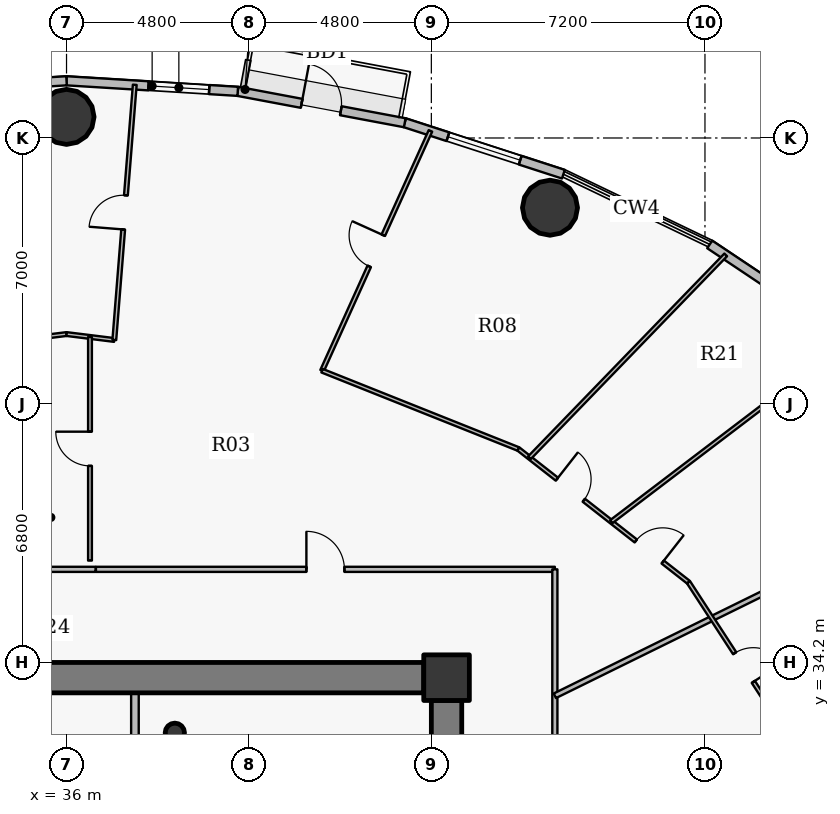
"""IFC4 building model, lengths in metres.
Left out: names, types, materials, properties, quantities, classifications, styles, units other than length and angle.
Written with IfcOpenShell. Run it as: python <this file> out.ifc"""

import sys

from ifc_helpers import new_model, si_unit, direction, frame, frame_2d, origin, origin_2d, place, context, subcontext, project, spatial, rectangle, hollow_circle, extrude, source, transform, mapped, element, fill, save


model = new_model("IFC4")
c1 = context("Model", 3, precision=1e-05, world=origin(), true_north=direction((0.0, 1.0)))
c2 = subcontext(c1, "Body", "Model", "MODEL_VIEW")
j1 = project(units=[si_unit("LENGTHUNIT", "METRE"), si_unit("PLANEANGLEUNIT", "RADIAN")], contexts=[c1])
p1 = place(None, origin())
s1 = spatial("IfcSite", under=j1, at=p1, CompositionType="ELEMENT")
p2 = place(p1, origin())
s2 = spatial("IfcBuilding", under=s1, at=p2, CompositionType="ELEMENT")
p3 = place(p2, frame((0.0, 0.0, 142.2)))
s3 = spatial("IfcBuildingStorey", under=s2, at=p3, CompositionType="ELEMENT", Elevation=142.2)
p4 = place(p3, frame((46.0, 33.8, 0.0), z_axis=(0.0, 0.0, 1.0), x_axis=(1.0, 0.0, 0.0)))
e1 = element("IfcColumn", 1, at=p4, inside=s3, PredefinedType="COLUMN", context=c2, shape_type="SweptSolid", body=[
    extrude(rectangle(XDim=1.2, YDim=1.2, at=origin_2d()), origin(), (0.0, 0.0, 1.0), 3.75),
])
p5 = place(p3, frame((38.85, 32.35, 0.0), z_axis=(0.0, 0.0, 1.0), x_axis=(1.0, 0.0, 0.0)))
e2 = element("IfcColumn", 2, at=p5, inside=s3, PredefinedType="COLUMN", context=c2, shape_type="SweptSolid", body=[
    extrude(hollow_circle(Radius=0.254, WallThickness=0.02, at=origin_2d()), origin(), (0.0, 0.0, 1.0), 3.75),
])
p6 = place(p3, frame((26.6, 33.8, 0.0), z_axis=(0.0, 0.0, 1.0), x_axis=(1.0, 0.0, 0.0)))
e3 = element("IfcWall", 3, at=p6, inside=s3, PredefinedType="SHEAR", context=c2, shape_type="SweptSolid", body=[
    extrude(rectangle(XDim=18.8, YDim=0.8, at=frame_2d((9.4, 0.0))), origin(), (0.0, 0.0, 1.0), 2.9),
])
p7 = place(p3, frame((46.0, 33.2, 0.0), z_axis=(0.0, 0.0, 1.0), x_axis=(0.0, -1.0, 0.0)))
e4 = element("IfcWall", 4, at=p7, inside=s3, PredefinedType="SHEAR", context=c2, shape_type="SweptSolid", body=[
    extrude(rectangle(XDim=12.4, YDim=0.8, at=frame_2d((6.2, 0.0))), origin(), (0.0, 0.0, 1.0), 2.9),
])
p8 = place(p7, frame((5.79, 0.0, 0.0)))
e5 = element("IfcOpeningElement", 5, at=p8, cuts=e4, PredefinedType="OPENING", context=c2, shape_type="SweptSolid", body=[
    extrude(rectangle(XDim=0.82, YDim=2.1, at=origin_2d()), frame((0.41, 0.41, 1.05), z_axis=(0.0, -1.0, 0.0), x_axis=(1.0, 0.0, 0.0)), (0.0, 0.0, 1.0), 0.82),
])
for number, where, z_axis, x_axis in (
    (6, (48.722, 46.165, 0.0), (0.0, 0.0, 1.0), (1.0, 0.0, 0.0)),
    (7, (36.0, 48.555, 0.0), (0.0, 0.0, 1.0), (1.0, 0.0, 0.0)),
):
    element("IfcColumn", number, at=place(p3, frame(where, z_axis=z_axis, x_axis=x_axis)), inside=s3, PredefinedType="COLUMN", context=c2, shape_type="SweptSolid", body=[
        extrude(hollow_circle(Radius=0.725, WallThickness=0.042, at=origin_2d()), origin(), (0.0, 0.0, 1.0), 3.75),
    ])
p9 = place(p3, frame((52.925, 45.199, 0.0), z_axis=(0.0, 0.0, 1.0), x_axis=(0.831221811447, -0.555940914284, 0.0)))
e8 = element("IfcWall", 8, at=p9, inside=s3, PredefinedType="SOLIDWALL", context=c2, shape_type="SweptSolid", body=[
    extrude(rectangle(XDim=4.13, YDim=0.24, at=frame_2d((2.065, 0.0))), origin(), (0.0, 0.0, 1.0), 3.45),
])
p10 = place(p3, frame((44.9, 48.401, 0.0), z_axis=(0.0, 0.0, 1.0), x_axis=(0.951211346073, -0.308540070495, 0.0)))
e9 = element("IfcWall", 9, at=p10, inside=s3, PredefinedType="SOLIDWALL", context=c2, shape_type="SweptSolid", body=[
    extrude(rectangle(XDim=4.388, YDim=0.24, at=frame_2d((2.194, 0.0))), origin(), (0.0, 0.0, 1.0), 3.45),
])
p11 = place(p10, frame((1.194, 0.0, 0.9)))
e10 = element("IfcOpeningElement", 10, at=p11, cuts=e9, PredefinedType="OPENING", context=c2, shape_type="SweptSolid", body=[
    extrude(rectangle(XDim=2.0, YDim=1.75, at=origin_2d()), frame((1.0, 0.13, 0.875), z_axis=(0.0, -1.0, 0.0), x_axis=(1.0, 0.0, 0.0)), (0.0, 0.0, 1.0), 0.26),
])
p12 = place(p3, frame((40.506, 49.227, 0.0), z_axis=(0.0, 0.0, 1.0), x_axis=(0.982789252177, -0.184730305596, 0.0)))
e11 = element("IfcWall", 11, at=p12, inside=s3, PredefinedType="SOLIDWALL", context=c2, shape_type="SweptSolid", body=[
    extrude(rectangle(XDim=4.471, YDim=0.24, at=frame_2d((2.235, 0.0))), origin(), (0.0, 0.0, 1.0), 3.45),
])
p13 = place(p12, frame((1.711, 0.0, 0.0)))
e12 = element("IfcOpeningElement", 12, at=p13, cuts=e11, PredefinedType="OPENING", context=c2, shape_type="SweptSolid", body=[
    extrude(rectangle(XDim=1.05, YDim=2.15, at=origin_2d()), frame((0.525, 0.13, 1.075), z_axis=(0.0, -1.0, 0.0), x_axis=(1.0, 0.0, 0.0)), (0.0, 0.0, 1.0), 0.26),
])
p14 = place(p3, frame((36.0, 49.505, 0.0), z_axis=(0.0, 0.0, 1.0), x_axis=(0.998107531589, -0.061492726276, 0.0)))
e13 = element("IfcWall", 13, at=p14, inside=s3, PredefinedType="SOLIDWALL", context=c2, shape_type="SweptSolid", body=[
    extrude(rectangle(XDim=4.514, YDim=0.24, at=frame_2d((2.257, 0.0))), origin(), (0.0, 0.0, 1.0), 3.45),
])
p15 = place(p14, frame((2.161, 0.0, 0.9)))
e14 = element("IfcOpeningElement", 14, at=p15, cuts=e13, PredefinedType="OPENING", context=c2, shape_type="SweptSolid", body=[
    extrude(rectangle(XDim=1.6, YDim=1.75, at=origin_2d()), frame((0.8, 0.13, 0.875), z_axis=(0.0, -1.0, 0.0), x_axis=(1.0, 0.0, 0.0)), (0.0, 0.0, 1.0), 0.26),
])
p16 = place(p3, frame((31.494, 49.227, 0.0), z_axis=(0.0, 0.0, 1.0), x_axis=(0.998107531589, 0.061492726276, 0.0)))
e15 = element("IfcWall", 15, at=p16, inside=s3, PredefinedType="SOLIDWALL", context=c2, shape_type="SweptSolid", body=[
    extrude(rectangle(XDim=4.514, YDim=0.24, at=frame_2d((2.257, 0.0))), origin(), (0.0, 0.0, 1.0), 3.45),
])
p17 = place(p16, frame((1.257, 0.0, 0.9)))
e16 = element("IfcOpeningElement", 16, at=p17, cuts=e15, PredefinedType="OPENING", context=c2, shape_type="SweptSolid", body=[
    extrude(rectangle(XDim=2.0, YDim=1.75, at=origin_2d()), frame((1.0, 0.13, 0.875), z_axis=(0.0, -1.0, 0.0), x_axis=(1.0, 0.0, 0.0)), (0.0, 0.0, 1.0), 0.26),
])
p18 = place(p3, frame((29.749, 42.066, 0.0), z_axis=(0.0, 0.0, 1.0), x_axis=(0.992395485088, 0.123090215599, 0.0)))
e17 = element("IfcWall", 17, at=p18, inside=s3, PredefinedType="PARTITIONING", context=c2, shape_type="SweptSolid", body=[
    extrude(rectangle(XDim=6.299, YDim=0.1, at=frame_2d((3.15, 0.0))), origin(), (0.0, 0.0, 1.0), 2.885),
])
p19 = place(p3, frame((36.0, 42.841, 0.0), z_axis=(0.0, 0.0, 1.0), x_axis=(0.992384274499, -0.123180565541, 0.0)))
e18 = element("IfcWall", 18, at=p19, inside=s3, PredefinedType="PARTITIONING", context=c2, shape_type="SweptSolid", body=[
    extrude(rectangle(XDim=1.267, YDim=0.1, at=frame_2d((0.633, 0.0))), origin(), (0.0, 0.0, 1.0), 2.885),
])
p20 = place(p3, frame((36.617, 36.881, 0.0), z_axis=(0.0, 0.0, 1.0), x_axis=(0.0, 1.0, 0.0)))
e19 = element("IfcWall", 19, at=p20, inside=s3, PredefinedType="PARTITIONING", context=c2, shape_type="SweptSolid", body=[
    extrude(rectangle(XDim=5.884, YDim=0.1, at=frame_2d((2.942, 0.0))), origin(), (0.0, 0.0, 1.0), 3.45),
])
p21 = place(p20, frame((2.492, 0.0, 0.0)))
e20 = element("IfcOpeningElement", 20, at=p21, cuts=e19, PredefinedType="OPENING", context=c2, shape_type="SweptSolid", body=[
    extrude(rectangle(XDim=0.9, YDim=2.1, at=origin_2d()), frame((0.45, 0.06, 1.05), z_axis=(0.0, -1.0, 0.0), x_axis=(1.0, 0.0, 0.0)), (0.0, 0.0, 1.0), 0.12),
])
p22 = place(p3, frame((36.774, 36.65, 0.0), z_axis=(0.0, 0.0, 1.0), x_axis=(1.0, 0.0, 0.0)))
e21 = element("IfcWall", 21, at=p22, inside=s3, PredefinedType="PARTITIONING", context=c2, shape_type="SweptSolid", body=[
    extrude(rectangle(XDim=12.076, YDim=0.135, at=frame_2d((6.038, 0.0))), origin(), (0.0, 0.0, 1.0), 2.885),
])
p23 = place(p22, frame((5.538, 0.0, 0.0)))
e22 = element("IfcOpeningElement", 22, at=p23, cuts=e21, PredefinedType="OPENING", context=c2, shape_type="SweptSolid", body=[
    extrude(rectangle(XDim=1.0, YDim=2.15, at=origin_2d()), frame((0.5, 0.078, 1.075), z_axis=(0.0, -1.0, 0.0), x_axis=(1.0, 0.0, 0.0)), (0.0, 0.0, 1.0), 0.155),
])
p24 = place(p3, frame((37.258, 42.685, 0.0), z_axis=(0.0, 0.0, 1.0), x_axis=(0.079919529762, 0.9968013186, 0.0)))
e23 = element("IfcWall", 23, at=p24, inside=s3, PredefinedType="PARTITIONING", context=c2, shape_type="SweptSolid", body=[
    extrude(rectangle(XDim=6.736, YDim=0.1, at=frame_2d((3.368, 0.0))), origin(), (0.0, 0.0, 1.0), 2.885),
])
p25 = place(p24, frame((2.918, 0.0, 0.0)))
e24 = element("IfcOpeningElement", 24, at=p25, cuts=e23, PredefinedType="OPENING", context=c2, shape_type="SweptSolid", body=[
    extrude(rectangle(XDim=0.9, YDim=2.1, at=origin_2d()), frame((0.45, 0.06, 1.05), z_axis=(0.0, -1.0, 0.0), x_axis=(1.0, 0.0, 0.0)), (0.0, 0.0, 1.0), 0.12),
])
p26 = place(p3, frame((37.8, 31.05, 0.0), z_axis=(0.0, 0.0, 1.0), x_axis=(0.0, 1.0, 0.0)))
e25 = element("IfcWall", 25, at=p26, inside=s3, PredefinedType="PARTITIONING", context=c2, shape_type="SweptSolid", body=[
    extrude(rectangle(XDim=2.35, YDim=0.2, at=frame_2d((1.175, 0.0))), origin(), (0.0, 0.0, 1.0), 3.035),
])
p27 = place(p3, frame((42.724, 41.877, 0.0), z_axis=(0.0, 0.0, 1.0), x_axis=(0.411868207503, 0.911243425023, 0.0)))
e26 = element("IfcWall", 26, at=p27, inside=s3, PredefinedType="PARTITIONING", context=c2, shape_type="SweptSolid", body=[
    extrude(rectangle(XDim=6.925, YDim=0.1, at=frame_2d((3.462, 0.0))), origin(), (0.0, 0.0, 1.0), 2.885),
])
p28 = place(p27, frame((3.012, 0.0, 0.0)))
e27 = element("IfcOpeningElement", 27, at=p28, cuts=e26, PredefinedType="OPENING", context=c2, shape_type="SweptSolid", body=[
    extrude(rectangle(XDim=0.9, YDim=2.1, at=origin_2d()), frame((0.45, 0.06, 1.05), z_axis=(0.0, -1.0, 0.0), x_axis=(1.0, 0.0, 0.0)), (0.0, 0.0, 1.0), 0.12),
])
p29 = place(p3, frame((42.724, 41.877, 0.0), z_axis=(0.0, 0.0, 1.0), x_axis=(0.928806258388, -0.370565695093, 0.0)))
e28 = element("IfcWall", 28, at=p29, inside=s3, PredefinedType="PARTITIONING", context=c2, shape_type="SweptSolid", body=[
    extrude(rectangle(XDim=5.562, YDim=0.1, at=frame_2d((2.781, 0.0))), origin(), (0.0, 0.0, 1.0), 2.885),
])
p30 = place(p3, frame((47.891, 39.816, 0.0), z_axis=(0.0, 0.0, 1.0), x_axis=(0.787347250317, -0.61650977885, 0.0)))
e29 = element("IfcWall", 29, at=p30, inside=s3, PredefinedType="PARTITIONING", context=c2, shape_type="SweptSolid", body=[
    extrude(rectangle(XDim=5.683, YDim=0.1, at=frame_2d((2.842, 0.0))), origin(), (0.0, 0.0, 1.0), 2.885),
])
p31 = place(p30, frame((3.923, 0.0, 0.0)))
e30 = element("IfcOpeningElement", 30, at=p31, cuts=e29, PredefinedType="OPENING", context=c2, shape_type="SweptSolid", body=[
    extrude(rectangle(XDim=0.9, YDim=2.1, at=origin_2d()), frame((0.45, 0.06, 1.05), z_axis=(0.0, -1.0, 0.0), x_axis=(1.0, 0.0, 0.0)), (0.0, 0.0, 1.0), 0.12),
])
p32 = place(p30, frame((1.286, 0.0, 0.0)))
e31 = element("IfcOpeningElement", 31, at=p32, cuts=e29, PredefinedType="OPENING", context=c2, shape_type="SweptSolid", body=[
    extrude(rectangle(XDim=0.9, YDim=2.1, at=origin_2d()), frame((0.45, 0.06, 1.05), z_axis=(0.0, -1.0, 0.0), x_axis=(1.0, 0.0, 0.0)), (0.0, 0.0, 1.0), 0.12),
])
p33 = place(p3, frame((48.182, 39.588, 0.0), z_axis=(0.0, 0.0, 1.0), x_axis=(0.695422522839, 0.718601081775, 0.0)))
e32 = element("IfcWall", 32, at=p33, inside=s3, PredefinedType="PARTITIONING", context=c2, shape_type="SweptSolid", body=[
    extrude(rectangle(XDim=7.426, YDim=0.1, at=frame_2d((3.713, 0.0))), origin(), (0.0, 0.0, 1.0), 2.885),
])
p34 = place(p3, frame((48.85, 17.35, 0.0), z_axis=(0.0, 0.0, 1.0), x_axis=(0.0, 1.0, 0.0)))
e33 = element("IfcWall", 33, at=p34, inside=s3, PredefinedType="PARTITIONING", context=c2, shape_type="SweptSolid", body=[
    extrude(rectangle(XDim=19.3, YDim=0.135, at=frame_2d((9.65, 0.0))), origin(), (0.0, 0.0, 1.0), 2.885),
])
p35 = place(p34, frame((7.609, 0.0, 0.0)))
e34 = element("IfcOpeningElement", 34, at=p35, cuts=e33, PredefinedType="OPENING", context=c2, shape_type="SweptSolid", body=[
    extrude(rectangle(XDim=1.0, YDim=2.15, at=origin_2d()), frame((0.5, 0.078, 1.075), z_axis=(0.0, -1.0, 0.0), x_axis=(1.0, 0.0, 0.0)), (0.0, 0.0, 1.0), 0.155),
])
p36 = place(p3, frame((48.85, 33.323, 0.0), z_axis=(0.0, 0.0, 1.0), x_axis=(0.897255437174, 0.44151181237, 0.0)))
e35 = element("IfcWall", 35, at=p36, inside=s3, PredefinedType="PARTITIONING", context=c2, shape_type="SweptSolid", body=[
    extrude(rectangle(XDim=12.746, YDim=0.135, at=frame_2d((6.373, 0.0))), origin(), (0.0, 0.0, 1.0), 2.885),
])
p37 = place(p3, frame((50.334, 37.903, 0.0), z_axis=(0.0, 0.0, 1.0), x_axis=(0.795918180565, 0.60540420369, 0.0)))
e36 = element("IfcWall", 36, at=p37, inside=s3, PredefinedType="PARTITIONING", context=c2, shape_type="SweptSolid", body=[
    extrude(rectangle(XDim=7.887, YDim=0.1, at=frame_2d((3.944, 0.0))), origin(), (0.0, 0.0, 1.0), 2.885),
])
p38 = place(p3, frame((52.366, 36.311, 0.0), z_axis=(0.0, 0.0, 1.0), x_axis=(0.545405249109, -0.838172484781, 0.0)))
e37 = element("IfcWall", 37, at=p38, inside=s3, PredefinedType="PARTITIONING", context=c2, shape_type="SweptSolid", body=[
    extrude(rectangle(XDim=5.269, YDim=0.1, at=frame_2d((2.634, 0.0))), origin(), (0.0, 0.0, 1.0), 2.885),
])
p39 = place(p38, frame((2.228, 0.0, 0.0)))
e38 = element("IfcOpeningElement", 38, at=p39, cuts=e37, PredefinedType="OPENING", context=c2, shape_type="SweptSolid", body=[
    extrude(rectangle(XDim=0.9, YDim=2.1, at=origin_2d()), frame((0.45, 0.06, 1.05), z_axis=(0.0, -1.0, 0.0), x_axis=(1.0, 0.0, 0.0)), (0.0, 0.0, 1.0), 0.12),
])
p40 = place(p3, frame((33.396, 36.65, 0.0), z_axis=(0.0, 0.0, 1.0), x_axis=(1.0, 0.0, 0.0)))
e39 = element("IfcWall", 39, at=p40, inside=s3, PredefinedType="PARTITIONING", context=c2, shape_type="SweptSolid", body=[
    extrude(rectangle(XDim=3.367, YDim=0.135, at=frame_2d((1.684, 0.0))), origin(), (0.0, 0.0, 1.0), 2.885),
])
p41 = place(p3, frame((46.4, 34.2, 0.0), z_axis=(0.0, 0.0, 1.0), x_axis=(-1.0, 0.0, 0.0)))
e40 = element("IfcWall", 40, at=p41, inside=s3, PredefinedType="PARTITIONING", context=c2, shape_type="SweptSolid", body=[
    extrude(rectangle(XDim=0.99, YDim=0.135, at=frame_2d((0.495, 0.0))), origin(), (0.0, 0.0, 1.0), 2.885),
])
p42 = place(p3, frame((46.4, 33.21, 0.0), z_axis=(0.0, 0.0, 1.0), x_axis=(0.0, 1.0, 0.0)))
e41 = element("IfcWall", 41, at=p42, inside=s3, PredefinedType="PARTITIONING", context=c2, shape_type="SweptSolid", body=[
    extrude(rectangle(XDim=0.683, YDim=0.135, at=frame_2d((0.341, 0.0))), origin(), (0.0, 0.0, 1.0), 3.45),
])
m1 = source(origin(), c2, "Body", "SweptSolid", [
    extrude(rectangle(XDim=2.0, YDim=1.75, at=origin_2d()), frame((1.0, 0.03, 0.875), z_axis=(0.0, -1.0, 0.0), x_axis=(1.0, 0.0, 0.0)), (0.0, 0.0, 1.0), 0.06),
])
p43 = place(p11, origin())
e42 = element("IfcWindow", 42, at=p43, inside=s3, PartitioningType="DOUBLE_PANEL_VERTICAL", PredefinedType="WINDOW", context=c2, shape_type="MappedRepresentation", body=[
    mapped(m1, transform((0.0, 0.0, 0.0), x_axis=(1.0, 0.0, 0.0), y_axis=(0.0, 1.0, 0.0), z_axis=(0.0, 0.0, 1.0), scale=1.0)),
])
fill(e10, e42)
m2 = source(origin(), c2, "Body", "SweptSolid", [
    extrude(rectangle(XDim=1.05, YDim=2.15, at=origin_2d()), frame((0.525, 0.025, 1.075), z_axis=(0.0, -1.0, 0.0), x_axis=(1.0, 0.0, 0.0)), (0.0, 0.0, 1.0), 0.05),
])
p44 = place(p13, origin())
e43 = element("IfcDoor", 43, at=p44, inside=s3, OperationType="SINGLE_SWING_LEFT", PredefinedType="DOOR", context=c2, shape_type="MappedRepresentation", body=[
    mapped(m2, transform((0.0, 0.0, 0.0), x_axis=(1.0, 0.0, 0.0), y_axis=(0.0, 1.0, 0.0), z_axis=(0.0, 0.0, 1.0), scale=1.0)),
])
fill(e12, e43)
m3 = source(origin(), c2, "Body", "SweptSolid", [
    extrude(rectangle(XDim=1.6, YDim=1.75, at=origin_2d()), frame((0.8, 0.03, 0.875), z_axis=(0.0, -1.0, 0.0), x_axis=(1.0, 0.0, 0.0)), (0.0, 0.0, 1.0), 0.06),
])
p45 = place(p15, origin())
e44 = element("IfcWindow", 44, at=p45, inside=s3, PartitioningType="DOUBLE_PANEL_VERTICAL", PredefinedType="WINDOW", context=c2, shape_type="MappedRepresentation", body=[
    mapped(m3, transform((0.0, 0.0, 0.0), x_axis=(1.0, 0.0, 0.0), y_axis=(0.0, 1.0, 0.0), z_axis=(0.0, 0.0, 1.0), scale=1.0)),
])
fill(e14, e44)
m4 = source(origin(), c2, "Body", "SweptSolid", [
    extrude(rectangle(XDim=0.9, YDim=2.1, at=origin_2d()), frame((0.45, 0.025, 1.05), z_axis=(0.0, -1.0, 0.0), x_axis=(1.0, 0.0, 0.0)), (0.0, 0.0, 1.0), 0.05),
])
p46 = place(p39, origin())
e45 = element("IfcDoor", 45, at=p46, inside=s3, OperationType="SINGLE_SWING_RIGHT", PredefinedType="DOOR", context=c2, shape_type="MappedRepresentation", body=[
    mapped(m4, transform((0.0, 0.0, 0.0), x_axis=(1.0, 0.0, 0.0), y_axis=(0.0, 1.0, 0.0), z_axis=(0.0, 0.0, 1.0), scale=1.0)),
])
fill(e38, e45)
m5 = source(origin(), c2, "Body", "SweptSolid", [
    extrude(rectangle(XDim=1.0, YDim=2.15, at=origin_2d()), frame((0.5, 0.025, 1.075), z_axis=(0.0, -1.0, 0.0), x_axis=(1.0, 0.0, 0.0)), (0.0, 0.0, 1.0), 0.05),
])
p47 = place(p23, origin())
e46 = element("IfcDoor", 46, at=p47, inside=s3, OperationType="SINGLE_SWING_LEFT", PredefinedType="DOOR", context=c2, shape_type="MappedRepresentation", body=[
    mapped(m5, transform((0.0, 0.0, 0.0), x_axis=(1.0, 0.0, 0.0), y_axis=(0.0, 1.0, 0.0), z_axis=(0.0, 0.0, 1.0), scale=1.0)),
])
fill(e22, e46)
p48 = place(p31, origin())
e47 = element("IfcDoor", 47, at=p48, inside=s3, OperationType="SINGLE_SWING_RIGHT", PredefinedType="DOOR", context=c2, shape_type="MappedRepresentation", body=[
    mapped(m4, transform((0.0, 0.0, 0.0), x_axis=(1.0, 0.0, 0.0), y_axis=(0.0, 1.0, 0.0), z_axis=(0.0, 0.0, 1.0), scale=1.0)),
])
fill(e30, e47)
p49 = place(p32, origin())
e48 = element("IfcDoor", 48, at=p49, inside=s3, OperationType="SINGLE_SWING_LEFT", PredefinedType="DOOR", context=c2, shape_type="MappedRepresentation", body=[
    mapped(m4, transform((0.0, 0.0, 0.0), x_axis=(1.0, 0.0, 0.0), y_axis=(0.0, 1.0, 0.0), z_axis=(0.0, 0.0, 1.0), scale=1.0)),
])
fill(e31, e48)
p50 = place(p28, origin())
e49 = element("IfcDoor", 49, at=p50, inside=s3, OperationType="SINGLE_SWING_RIGHT", PredefinedType="DOOR", context=c2, shape_type="MappedRepresentation", body=[
    mapped(m4, transform((0.0, 0.0, 0.0), x_axis=(1.0, 0.0, 0.0), y_axis=(0.0, 1.0, 0.0), z_axis=(0.0, 0.0, 1.0), scale=1.0)),
])
fill(e27, e49)
p51 = place(p25, origin())
e50 = element("IfcDoor", 50, at=p51, inside=s3, OperationType="SINGLE_SWING_LEFT", PredefinedType="DOOR", context=c2, shape_type="MappedRepresentation", body=[
    mapped(m4, transform((0.0, 0.0, 0.0), x_axis=(1.0, 0.0, 0.0), y_axis=(0.0, 1.0, 0.0), z_axis=(0.0, 0.0, 1.0), scale=1.0)),
])
fill(e24, e50)
p52 = place(p21, origin())
e51 = element("IfcDoor", 51, at=p52, inside=s3, OperationType="SINGLE_SWING_RIGHT", PredefinedType="DOOR", context=c2, shape_type="MappedRepresentation", body=[
    mapped(m4, transform((0.0, 0.0, 0.0), x_axis=(1.0, 0.0, 0.0), y_axis=(0.0, 1.0, 0.0), z_axis=(0.0, 0.0, 1.0), scale=1.0)),
])
fill(e20, e51)
save(model, sys.argv[1])
